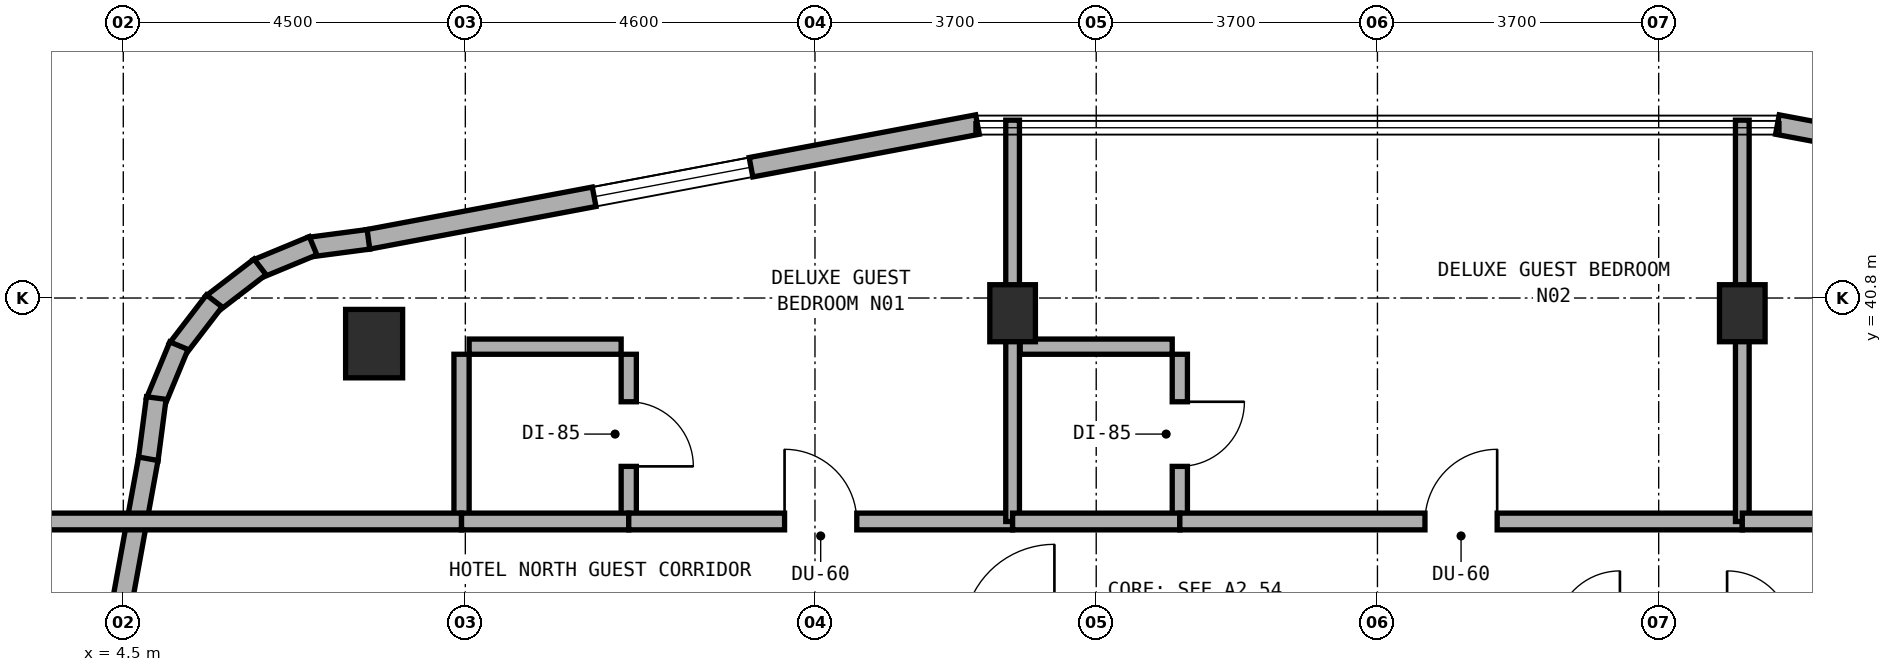
"""IFC4 building model, lengths in metres.
Left out: names, types, materials, properties, quantities, classifications, styles, units other than length and angle.
Written with IfcOpenShell. Run it as: python <this file> out.ifc"""

import sys

from ifc_helpers import new_model, si_unit, direction, frame, frame_2d, origin, origin_2d, place, context, subcontext, project, spatial, rectangle, extrude, element, fill, save


model = new_model("IFC4")
c1 = context("Model", 3, precision=1e-05, world=origin(), true_north=direction((0.0, 1.0)))
c2 = subcontext(c1, "Body", "Model", "MODEL_VIEW")
j1 = project(units=[si_unit("LENGTHUNIT", "METRE"), si_unit("PLANEANGLEUNIT", "RADIAN")], contexts=[c1])
p1 = place(None, origin())
s1 = spatial("IfcSite", under=j1, at=p1, CompositionType="ELEMENT")
p2 = place(p1, origin())
s2 = spatial("IfcBuilding", under=s1, at=p2, CompositionType="ELEMENT")
p3 = place(p2, frame((0.0, 0.0, 250.4)))
s3 = spatial("IfcBuildingStorey", under=s2, at=p3, CompositionType="ELEMENT", Elevation=250.4)
for number, where, z_axis, x_axis in (
    (1, (16.2, 40.6, 0.0), (0.0, 0.0, 1.0), (1.0, 0.0, 0.0)),
    (2, (25.8, 40.6, 0.0), (0.0, 0.0, 1.0), (1.0, 0.0, 0.0)),
):
    element("IfcColumn", number, at=place(p3, frame(where, z_axis=z_axis, x_axis=x_axis)), inside=s3, PredefinedType="COLUMN", context=c2, shape_type="SweptSolid", body=[
        extrude(rectangle(XDim=0.6, YDim=0.75, at=origin_2d()), origin(), (0.0, 0.0, 1.0), 3.6),
    ])
p4 = place(p3, frame((7.8, 40.2, 0.0), z_axis=(0.0, 0.0, 1.0), x_axis=(1.0, 0.0, 0.0)))
e3 = element("IfcColumn", 3, at=p4, inside=s3, PredefinedType="COLUMN", context=c2, shape_type="SweptSolid", body=[
    extrude(rectangle(XDim=0.75, YDim=0.9, at=origin_2d()), origin(), (0.0, 0.0, 1.0), 3.6),
])
p5 = place(p3, frame((34.284, 41.571, 0.0), z_axis=(0.0, 0.0, 1.0), x_axis=(-0.982719489139, 0.185101068789, 0.0)))
e4 = element("IfcWall", 4, at=p5, inside=s3, PredefinedType="STANDARD", context=c2, shape_type="SweptSolid", body=[
    extrude(rectangle(XDim=8.163, YDim=0.26, at=frame_2d((4.082, 0.0))), origin(), (0.0, 0.0, 1.0), 3.32),
])
p6 = place(p5, frame((3.032, 0.0, 0.85)))
e5 = element("IfcOpeningElement", 5, at=p6, cuts=e4, PredefinedType="OPENING", context=c2, shape_type="SweptSolid", body=[
    extrude(rectangle(XDim=2.1, YDim=1.5, at=frame_2d((1.05, 0.75))), frame((0.0, 0.14, 0.0), z_axis=(0.0, -1.0, 0.0), x_axis=(1.0, 0.0, 0.0)), (0.0, 0.0, 1.0), 0.28),
])
p7 = place(p3, frame((15.738, 43.082, 0.0), z_axis=(0.0, 0.0, 1.0), x_axis=(-0.982719489139, -0.185101068789, 0.0)))
e6 = element("IfcWall", 6, at=p7, inside=s3, PredefinedType="STANDARD", context=c2, shape_type="SweptSolid", body=[
    extrude(rectangle(XDim=8.163, YDim=0.26, at=frame_2d((4.082, 0.0))), origin(), (0.0, 0.0, 1.0), 3.32),
])
p8 = place(p7, frame((3.032, 0.0, 0.85)))
e7 = element("IfcOpeningElement", 7, at=p8, cuts=e6, PredefinedType="OPENING", context=c2, shape_type="SweptSolid", body=[
    extrude(rectangle(XDim=2.1, YDim=1.5, at=frame_2d((1.05, 0.75))), frame((0.0, 0.14, 0.0), z_axis=(0.0, -1.0, 0.0), x_axis=(1.0, 0.0, 0.0)), (0.0, 0.0, 1.0), 0.28),
])
p9 = place(p3, frame((7.725, 41.572, 0.0), z_axis=(0.0, 0.0, 1.0), x_axis=(-0.991423406861, -0.130689052056, 0.0)))
e8 = element("IfcWall", 8, at=p9, inside=s3, PredefinedType="STANDARD", context=c2, shape_type="SweptSolid", body=[
    extrude(rectangle(XDim=0.781, YDim=0.26, at=frame_2d((0.39, 0.0))), origin(), (0.0, 0.0, 1.0), 3.32),
])
p10 = place(p3, frame((6.997, 41.488, 0.0), z_axis=(0.0, 0.0, 1.0), x_axis=(-0.923681457047, -0.383161279238, 0.0)))
e9 = element("IfcWall", 9, at=p10, inside=s3, PredefinedType="STANDARD", context=c2, shape_type="SweptSolid", body=[
    extrude(rectangle(XDim=0.799, YDim=0.26, at=frame_2d((0.399, 0.0))), origin(), (0.0, 0.0, 1.0), 3.32),
])
for number, where, z_axis, x_axis in (
    (10, (6.299, 41.21, 0.0), (0.0, 0.0, 1.0), (-0.793, -0.609, 0.0)),
    (11, (5.697, 40.762, 0.0), (0.0, 0.0, 1.0), (-0.609, -0.793, 0.0)),
):
    element("IfcWall", number, at=place(p3, frame(where, z_axis=z_axis, x_axis=x_axis)), inside=s3, PredefinedType="STANDARD", context=c2, shape_type="SweptSolid", body=[
        extrude(rectangle(XDim=0.798, YDim=0.26, at=frame_2d((0.399, 0.0))), origin(), (0.0, 0.0, 1.0), 3.32),
    ])
p11 = place(p3, frame((5.232, 40.173, 0.0), z_axis=(0.0, 0.0, 1.0), x_axis=(-0.382900540965, -0.923789573295, 0.0)))
e12 = element("IfcWall", 12, at=p11, inside=s3, PredefinedType="STANDARD", context=c2, shape_type="SweptSolid", body=[
    extrude(rectangle(XDim=0.799, YDim=0.26, at=frame_2d((0.399, 0.0))), origin(), (0.0, 0.0, 1.0), 3.32),
])
p12 = place(p3, frame((4.934, 39.484, 0.0), z_axis=(0.0, 0.0, 1.0), x_axis=(-0.130183552987, -0.991489910454, 0.0)))
e13 = element("IfcWall", 13, at=p12, inside=s3, PredefinedType="STANDARD", context=c2, shape_type="SweptSolid", body=[
    extrude(rectangle(XDim=0.816, YDim=0.26, at=frame_2d((0.408, 0.0))), origin(), (0.0, 0.0, 1.0), 3.32),
])
p13 = place(p3, frame((4.829, 38.685, 0.0), z_axis=(0.0, 0.0, 1.0), x_axis=(-0.179061111398, -0.983837953316, 0.0)))
e14 = element("IfcWall", 14, at=p13, inside=s3, PredefinedType="STANDARD", context=c2, shape_type="SweptSolid", body=[
    extrude(rectangle(XDim=8.438, YDim=0.26, at=frame_2d((4.219, 0.0))), origin(), (0.0, 0.0, 1.0), 3.32),
])
p14 = place(p13, frame((3.648, 0.0, 0.85)))
e15 = element("IfcOpeningElement", 15, at=p14, cuts=e14, PredefinedType="OPENING", context=c2, shape_type="SweptSolid", body=[
    extrude(rectangle(XDim=2.1, YDim=1.5, at=frame_2d((1.05, 0.75))), frame((0.0, 0.14, 0.0), z_axis=(0.0, -1.0, 0.0), x_axis=(1.0, 0.0, 0.0)), (0.0, 0.0, 1.0), 0.28),
])
p15 = place(p3, frame((11.15, 37.96, 0.0), z_axis=(0.0, 0.0, 1.0), x_axis=(0.0, 1.0, 0.0)))
e16 = element("IfcWall", 16, at=p15, inside=s3, PredefinedType="PLUMBINGWALL", context=c2, shape_type="SweptSolid", body=[
    extrude(rectangle(XDim=2.1, YDim=0.2, at=frame_2d((1.05, 0.0))), origin(), (0.0, 0.0, 1.0), 3.055),
])
p16 = place(p15, frame((0.625, 0.0, 0.0)))
e17 = element("IfcOpeningElement", 17, at=p16, cuts=e16, PredefinedType="OPENING", context=c2, shape_type="SweptSolid", body=[
    extrude(rectangle(XDim=0.85, YDim=2.1, at=frame_2d((0.425, 1.05))), frame((0.0, 0.11, 0.0), z_axis=(0.0, -1.0, 0.0), x_axis=(1.0, 0.0, 0.0)), (0.0, 0.0, 1.0), 0.22),
])
p17 = place(p3, frame((9.05, 40.16, 0.0), z_axis=(0.0, 0.0, 1.0), x_axis=(1.0, 0.0, 0.0)))
e18 = element("IfcWall", 18, at=p17, inside=s3, PredefinedType="PLUMBINGWALL", context=c2, shape_type="SweptSolid", body=[
    extrude(rectangle(XDim=2.0, YDim=0.2, at=frame_2d((1.0, 0.0))), origin(), (0.0, 0.0, 1.0), 3.015),
])
p18 = place(p3, frame((8.95, 37.96, 0.0), z_axis=(0.0, 0.0, 1.0), x_axis=(0.0, 1.0, 0.0)))
e19 = element("IfcWall", 19, at=p18, inside=s3, PredefinedType="PLUMBINGWALL", context=c2, shape_type="SweptSolid", body=[
    extrude(rectangle(XDim=2.1, YDim=0.2, at=frame_2d((1.05, 0.0))), origin(), (0.0, 0.0, 1.0), 3.055),
])
p19 = place(p3, frame((3.36, 37.86, 0.0), z_axis=(0.0, 0.0, 1.0), x_axis=(1.0, 0.0, 0.0)))
e20 = element("IfcWall", 20, at=p19, inside=s3, PredefinedType="SOLIDWALL", context=c2, shape_type="SweptSolid", body=[
    extrude(rectangle(XDim=5.59, YDim=0.22, at=frame_2d((2.795, 0.0))), origin(), (0.0, 0.0, 1.0), 2.745),
])
p20 = place(p3, frame((8.95, 37.86, 0.0), z_axis=(0.0, 0.0, 1.0), x_axis=(1.0, 0.0, 0.0)))
e21 = element("IfcWall", 21, at=p20, inside=s3, PredefinedType="SOLIDWALL", context=c2, shape_type="SweptSolid", body=[
    extrude(rectangle(XDim=2.2, YDim=0.22, at=frame_2d((1.1, 0.0))), origin(), (0.0, 0.0, 1.0), 3.32),
])
p21 = place(p3, frame((11.15, 37.86, 0.0), z_axis=(0.0, 0.0, 1.0), x_axis=(1.0, 0.0, 0.0)))
e22 = element("IfcWall", 22, at=p21, inside=s3, PredefinedType="SOLIDWALL", context=c2, shape_type="SweptSolid", body=[
    extrude(rectangle(XDim=5.05, YDim=0.22, at=frame_2d((2.525, 0.0))), origin(), (0.0, 0.0, 1.0), 2.745),
])
p22 = place(p21, frame((2.05, 0.0, 0.0)))
e23 = element("IfcOpeningElement", 23, at=p22, cuts=e22, PredefinedType="OPENING", context=c2, shape_type="SweptSolid", body=[
    extrude(rectangle(XDim=0.95, YDim=2.1, at=frame_2d((0.475, 1.05))), frame((0.0, 0.12, 0.0), z_axis=(0.0, -1.0, 0.0), x_axis=(1.0, 0.0, 0.0)), (0.0, 0.0, 1.0), 0.24),
])
p23 = place(p3, frame((16.2, 37.86, 0.0), z_axis=(0.0, 0.0, 1.0), x_axis=(0.0, 1.0, 0.0)))
e24 = element("IfcWall", 24, at=p23, inside=s3, PredefinedType="SOLIDWALL", context=c2, shape_type="SweptSolid", body=[
    extrude(rectangle(XDim=5.28, YDim=0.18, at=frame_2d((2.64, 0.0))), origin(), (0.0, 0.0, 1.0), 2.745),
])
p24 = place(p3, frame((18.4, 37.96, 0.0), z_axis=(0.0, 0.0, 1.0), x_axis=(0.0, 1.0, 0.0)))
e25 = element("IfcWall", 25, at=p24, inside=s3, PredefinedType="PLUMBINGWALL", context=c2, shape_type="SweptSolid", body=[
    extrude(rectangle(XDim=2.1, YDim=0.2, at=frame_2d((1.05, 0.0))), origin(), (0.0, 0.0, 1.0), 3.055),
])
p25 = place(p24, frame((0.625, 0.0, 0.0)))
e26 = element("IfcOpeningElement", 26, at=p25, cuts=e25, PredefinedType="OPENING", context=c2, shape_type="SweptSolid", body=[
    extrude(rectangle(XDim=0.85, YDim=2.1, at=frame_2d((0.425, 1.05))), frame((0.0, 0.11, 0.0), z_axis=(0.0, -1.0, 0.0), x_axis=(1.0, 0.0, 0.0)), (0.0, 0.0, 1.0), 0.22),
])
p26 = place(p3, frame((16.3, 40.16, 0.0), z_axis=(0.0, 0.0, 1.0), x_axis=(1.0, 0.0, 0.0)))
e27 = element("IfcWall", 27, at=p26, inside=s3, PredefinedType="PLUMBINGWALL", context=c2, shape_type="SweptSolid", body=[
    extrude(rectangle(XDim=2.0, YDim=0.2, at=frame_2d((1.0, 0.0))), origin(), (0.0, 0.0, 1.0), 3.32),
])
p27 = place(p3, frame((16.2, 37.86, 0.0), z_axis=(0.0, 0.0, 1.0), x_axis=(1.0, 0.0, 0.0)))
e28 = element("IfcWall", 28, at=p27, inside=s3, PredefinedType="SOLIDWALL", context=c2, shape_type="SweptSolid", body=[
    extrude(rectangle(XDim=2.2, YDim=0.22, at=frame_2d((1.1, 0.0))), origin(), (0.0, 0.0, 1.0), 2.745),
])
p28 = place(p3, frame((18.4, 37.86, 0.0), z_axis=(0.0, 0.0, 1.0), x_axis=(1.0, 0.0, 0.0)))
e29 = element("IfcWall", 29, at=p28, inside=s3, PredefinedType="SOLIDWALL", context=c2, shape_type="SweptSolid", body=[
    extrude(rectangle(XDim=7.4, YDim=0.22, at=frame_2d((3.7, 0.0))), origin(), (0.0, 0.0, 1.0), 2.745),
])
p29 = place(p28, frame((3.225, 0.0, 0.0)))
e30 = element("IfcOpeningElement", 30, at=p29, cuts=e29, PredefinedType="OPENING", context=c2, shape_type="SweptSolid", body=[
    extrude(rectangle(XDim=0.95, YDim=2.1, at=frame_2d((0.475, 1.05))), frame((0.0, 0.12, 0.0), z_axis=(0.0, -1.0, 0.0), x_axis=(1.0, 0.0, 0.0)), (0.0, 0.0, 1.0), 0.24),
])
p30 = place(p3, frame((25.8, 37.86, 0.0), z_axis=(0.0, 0.0, 1.0), x_axis=(0.0, 1.0, 0.0)))
e31 = element("IfcWall", 31, at=p30, inside=s3, PredefinedType="SOLIDWALL", context=c2, shape_type="SweptSolid", body=[
    extrude(rectangle(XDim=5.28, YDim=0.18, at=frame_2d((2.64, 0.0))), origin(), (0.0, 0.0, 1.0), 2.745),
])
p31 = place(p3, frame((25.8, 37.86, 0.0), z_axis=(0.0, 0.0, 1.0), x_axis=(1.0, 0.0, 0.0)))
e32 = element("IfcWall", 32, at=p31, inside=s3, PredefinedType="SOLIDWALL", context=c2, shape_type="SweptSolid", body=[
    extrude(rectangle(XDim=5.05, YDim=0.22, at=frame_2d((2.525, 0.0))), origin(), (0.0, 0.0, 1.0), 2.745),
])
p32 = place(p31, frame((2.05, 0.0, 0.0)))
e33 = element("IfcOpeningElement", 33, at=p32, cuts=e32, PredefinedType="OPENING", context=c2, shape_type="SweptSolid", body=[
    extrude(rectangle(XDim=0.95, YDim=2.1, at=frame_2d((0.475, 1.05))), frame((0.0, 0.12, 0.0), z_axis=(0.0, -1.0, 0.0), x_axis=(1.0, 0.0, 0.0)), (0.0, 0.0, 1.0), 0.24),
])
p33 = place(p8, origin())
e34 = element("IfcWindow", 34, at=p33, inside=s3, PartitioningType="SINGLE_PANEL", PredefinedType="WINDOW", context=c2, shape_type="SweptSolid", body=[
    extrude(rectangle(XDim=2.1, YDim=1.5, at=frame_2d((1.05, 0.75))), frame((0.0, 0.03, 0.0), z_axis=(0.0, -1.0, 0.0), x_axis=(1.0, 0.0, 0.0)), (0.0, 0.0, 1.0), 0.06),
])
fill(e7, e34)
p34 = place(p16, frame((0.85, 0.0, 0.0), z_axis=(0.0, 0.0, 1.0), x_axis=(-1.0, 0.0, 0.0)))
e35 = element("IfcDoor", 35, at=p34, inside=s3, OperationType="SINGLE_SWING_RIGHT", PredefinedType="DOOR", context=c2, shape_type="SweptSolid", body=[
    extrude(rectangle(XDim=0.85, YDim=2.1, at=frame_2d((0.425, 1.05))), frame((0.0, 0.025, 0.0), z_axis=(0.0, -1.0, 0.0), x_axis=(1.0, 0.0, 0.0)), (0.0, 0.0, 1.0), 0.05),
])
fill(e17, e35)
p35 = place(p22, origin())
e36 = element("IfcDoor", 36, at=p35, inside=s3, OperationType="SINGLE_SWING_LEFT", PredefinedType="DOOR", context=c2, shape_type="SweptSolid", body=[
    extrude(rectangle(XDim=0.95, YDim=2.1, at=frame_2d((0.475, 1.05))), frame((0.0, 0.025, 0.0), z_axis=(0.0, -1.0, 0.0), x_axis=(1.0, 0.0, 0.0)), (0.0, 0.0, 1.0), 0.05),
])
fill(e23, e36)
p36 = place(p25, frame((0.85, 0.0, 0.0), z_axis=(0.0, 0.0, 1.0), x_axis=(-1.0, 0.0, 0.0)))
e37 = element("IfcDoor", 37, at=p36, inside=s3, OperationType="SINGLE_SWING_LEFT", PredefinedType="DOOR", context=c2, shape_type="SweptSolid", body=[
    extrude(rectangle(XDim=0.85, YDim=2.1, at=frame_2d((0.425, 1.05))), frame((0.0, 0.025, 0.0), z_axis=(0.0, -1.0, 0.0), x_axis=(1.0, 0.0, 0.0)), (0.0, 0.0, 1.0), 0.05),
])
fill(e26, e37)
p37 = place(p29, origin())
e38 = element("IfcDoor", 38, at=p37, inside=s3, OperationType="SINGLE_SWING_RIGHT", PredefinedType="DOOR", context=c2, shape_type="SweptSolid", body=[
    extrude(rectangle(XDim=0.95, YDim=2.1, at=frame_2d((0.475, 1.05))), frame((0.0, 0.025, 0.0), z_axis=(0.0, -1.0, 0.0), x_axis=(1.0, 0.0, 0.0)), (0.0, 0.0, 1.0), 0.05),
])
fill(e30, e38)
save(model, sys.argv[1])
